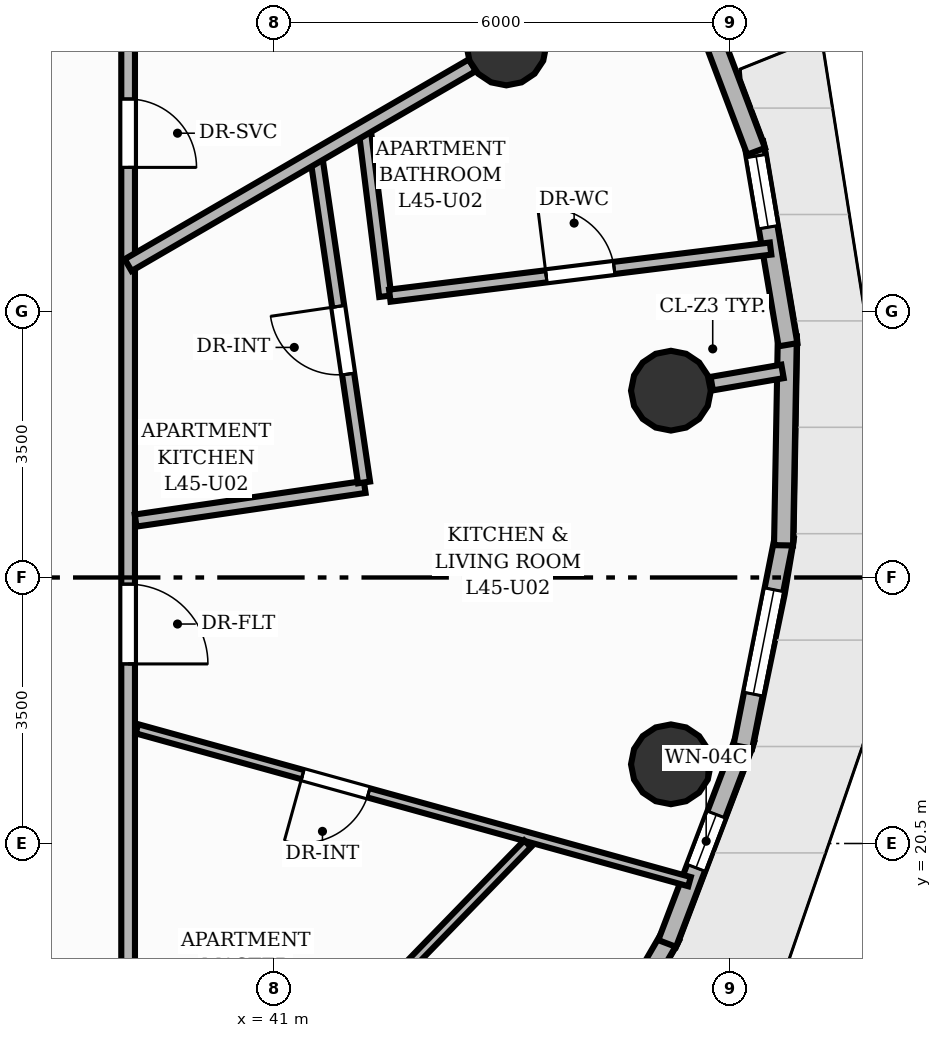
"""IFC4 building model, lengths in metres.
Left out: names, types, materials, properties, quantities, classifications, styles, units other than length and angle.
Written with IfcOpenShell. Run it as: python <this file> out.ifc"""

import sys

from ifc_helpers import new_model, si_unit, direction, frame, frame_2d, origin, origin_2d, place, context, subcontext, project, spatial, rectangle, circle, extrude, element, fill, save


model = new_model("IFC4")
c1 = context("Model", 3, precision=1e-05, world=origin(), true_north=direction((0.0, 1.0)))
c2 = subcontext(c1, "Body", "Model", "MODEL_VIEW")
j1 = project(units=[si_unit("LENGTHUNIT", "METRE"), si_unit("PLANEANGLEUNIT", "RADIAN")], contexts=[c1])
p1 = place(None, origin())
s1 = spatial("IfcSite", under=j1, at=p1, CompositionType="ELEMENT")
p2 = place(p1, origin())
s2 = spatial("IfcBuilding", under=s1, at=p2, CompositionType="ELEMENT")
p3 = place(p2, frame((0.0, 0.0, 152.16)))
s3 = spatial("IfcBuildingStorey", under=s2, at=p3, CompositionType="ELEMENT", Elevation=152.16)
for number, where, z_axis, x_axis in (
    (1, (46.221, 26.458, 0.0), (0.0, 0.0, 1.0), (1.0, 0.0, 0.0)),
    (2, (44.056, 31.0, 0.0), (0.0, 0.0, 1.0), (1.0, 0.0, 0.0)),
    (3, (46.221, 21.542, 0.0), (0.0, 0.0, 1.0), (1.0, 0.0, 0.0)),
):
    element("IfcColumn", number, at=place(p3, frame(where, z_axis=z_axis, x_axis=x_axis)), inside=s3, PredefinedType="COLUMN", context=c2, shape_type="SweptSolid", body=[
        extrude(circle(Radius=0.525, at=origin_2d()), origin(), (0.0, 0.0, 1.0), 3.2),
    ])
p4 = place(p3, frame((46.219, 19.283, 0.0), z_axis=(0.0, 0.0, 1.0), x_axis=(-0.502009170613, -0.864862296912, 0.0)))
e4 = element("IfcWall", 4, at=p4, inside=s3, PredefinedType="SOLIDWALL", context=c2, shape_type="SweptSolid", body=[
    extrude(rectangle(XDim=2.937, YDim=0.25, at=frame_2d((1.469, 0.0))), origin(), (0.0, 0.0, 1.0), 2.96),
])
p5 = place(p4, frame((0.768, 0.0, 0.85)))
e5 = element("IfcOpeningElement", 5, at=p5, cuts=e4, PredefinedType="OPENING", context=c2, shape_type="SweptSolid", body=[
    extrude(rectangle(XDim=1.4, YDim=1.55, at=frame_2d((0.7, 0.775))), frame((0.0, 0.135, 0.0), z_axis=(0.0, -1.0, 0.0), x_axis=(1.0, 0.0, 0.0)), (0.0, 0.0, 1.0), 0.27),
])
p6 = place(p3, frame((47.198, 21.877, 0.0), z_axis=(0.0, 0.0, 1.0), x_axis=(-0.356178525313, -0.934417924756, 0.0)))
e6 = element("IfcWall", 6, at=p6, inside=s3, PredefinedType="SOLIDWALL", context=c2, shape_type="SweptSolid", body=[
    extrude(rectangle(XDim=2.882, YDim=0.25, at=frame_2d((1.441, 0.0))), origin(), (0.0, 0.0, 1.0), 2.96),
])
p7 = place(p6, frame((1.066, 0.0, 0.85)))
e7 = element("IfcOpeningElement", 7, at=p7, cuts=e6, PredefinedType="OPENING", context=c2, shape_type="SweptSolid", body=[
    extrude(rectangle(XDim=0.75, YDim=1.55, at=frame_2d((0.375, 0.775))), frame((0.0, 0.135, 0.0), z_axis=(0.0, -1.0, 0.0), x_axis=(1.0, 0.0, 0.0)), (0.0, 0.0, 1.0), 0.27),
])
p8 = place(p3, frame((47.715, 24.534, 0.0), z_axis=(0.0, 0.0, 1.0), x_axis=(-0.194099406303, -0.980981865517, 0.0)))
e8 = element("IfcWall", 8, at=p8, inside=s3, PredefinedType="SOLIDWALL", context=c2, shape_type="SweptSolid", body=[
    extrude(rectangle(XDim=2.817, YDim=0.25, at=frame_2d((1.409, 0.0))), origin(), (0.0, 0.0, 1.0), 2.96),
])
p9 = place(p8, frame((0.709, 0.0, 0.85)))
e9 = element("IfcOpeningElement", 9, at=p9, cuts=e8, PredefinedType="OPENING", context=c2, shape_type="SweptSolid", body=[
    extrude(rectangle(XDim=1.4, YDim=1.55, at=frame_2d((0.7, 0.775))), frame((0.0, 0.135, 0.0), z_axis=(0.0, -1.0, 0.0), x_axis=(1.0, 0.0, 0.0)), (0.0, 0.0, 1.0), 0.27),
])
p10 = place(p3, frame((47.753, 27.175, 0.0), z_axis=(0.0, 0.0, 1.0), x_axis=(-0.018273942119, -0.999833017578, 0.0)))
e10 = element("IfcWall", 10, at=p10, inside=s3, PredefinedType="SOLIDWALL", context=c2, shape_type="SweptSolid", body=[
    extrude(rectangle(XDim=2.752, YDim=0.25, at=frame_2d((1.376, 0.0))), origin(), (0.0, 0.0, 1.0), 2.96),
])
p11 = place(p3, frame((47.313, 29.718, 0.0), z_axis=(0.0, 0.0, 1.0), x_axis=(0.166721354457, -0.9860040517, 0.0)))
e11 = element("IfcWall", 11, at=p11, inside=s3, PredefinedType="SOLIDWALL", context=c2, shape_type="SweptSolid", body=[
    extrude(rectangle(XDim=2.693, YDim=0.25, at=frame_2d((1.346, 0.0))), origin(), (0.0, 0.0, 1.0), 2.96),
])
p12 = place(p11, frame((0.175, 0.0, 0.85)))
e12 = element("IfcOpeningElement", 12, at=p12, cuts=e11, PredefinedType="OPENING", context=c2, shape_type="SweptSolid", body=[
    extrude(rectangle(XDim=0.95, YDim=1.45, at=frame_2d((0.475, 0.725))), frame((0.0, 0.135, 0.0), z_axis=(0.0, -1.0, 0.0), x_axis=(1.0, 0.0, 0.0)), (0.0, 0.0, 1.0), 0.27),
])
p13 = place(p3, frame((46.408, 32.086, 0.0), z_axis=(0.0, 0.0, 1.0), x_axis=(0.353022229402, -0.93561493444, 0.0)))
e13 = element("IfcWall", 13, at=p13, inside=s3, PredefinedType="SOLIDWALL", context=c2, shape_type="SweptSolid", body=[
    extrude(rectangle(XDim=2.648, YDim=0.25, at=frame_2d((1.324, 0.0))), origin(), (0.0, 0.0, 1.0), 2.96),
])
p14 = place(p3, frame((46.758, 26.551, 0.0), z_axis=(0.0, 0.0, 1.0), x_axis=(0.985363023372, 0.170469094476, 0.0)))
e14 = element("IfcWall", 14, at=p14, inside=s3, PredefinedType="PARTITIONING", context=c2, shape_type="SweptSolid", body=[
    extrude(rectangle(XDim=0.945, YDim=0.18, at=frame_2d((0.473, 0.0))), origin(), (0.0, 0.0, 1.0), 2.336),
])
p15 = place(p3, frame((39.08, 32.58, 0.0), z_axis=(0.0, 0.0, 1.0), x_axis=(0.0, -1.0, 0.0)))
e15 = element("IfcWall", 15, at=p15, inside=s3, PredefinedType="PARTITIONING", context=c2, shape_type="SweptSolid", body=[
    extrude(rectangle(XDim=17.16, YDim=0.18, at=frame_2d((8.58, 0.0))), origin(), (0.0, 0.0, 1.0), 2.955),
])
p16 = place(p15, frame((8.667, 0.0, 0.0)))
e16 = element("IfcOpeningElement", 16, at=p16, cuts=e15, PredefinedType="OPENING", context=c2, shape_type="SweptSolid", body=[
    extrude(rectangle(XDim=1.05, YDim=2.15, at=frame_2d((0.525, 1.075))), frame((0.0, 0.1, 0.0), z_axis=(0.0, -1.0, 0.0), x_axis=(1.0, 0.0, 0.0)), (0.0, 0.0, 1.0), 0.2),
])
p17 = place(p15, frame((2.284, 0.0, 0.0)))
e17 = element("IfcOpeningElement", 17, at=p17, cuts=e15, PredefinedType="OPENING", context=c2, shape_type="SweptSolid", body=[
    extrude(rectangle(XDim=0.9, YDim=2.1, at=frame_2d((0.45, 1.05))), frame((0.0, 0.1, 0.0), z_axis=(0.0, -1.0, 0.0), x_axis=(1.0, 0.0, 0.0)), (0.0, 0.0, 1.0), 0.2),
])
p18 = place(p3, frame((42.189, 29.916, 0.0), z_axis=(0.0, 0.0, 1.0), x_axis=(0.122809822633, -0.99243022297, 0.0)))
e18 = element("IfcWall", 18, at=p18, inside=s3, PredefinedType="PLUMBINGWALL", context=c2, shape_type="SweptSolid", body=[
    extrude(rectangle(XDim=2.232, YDim=0.16, at=frame_2d((1.116, 0.0))), origin(), (0.0, 0.0, 1.0), 2.955),
])
p19 = place(p3, frame((42.523, 27.708, 0.0), z_axis=(0.0, 0.0, 1.0), x_axis=(0.992432598709, 0.122790622685, 0.0)))
e19 = element("IfcWall", 19, at=p19, inside=s3, PredefinedType="PLUMBINGWALL", context=c2, shape_type="SweptSolid", body=[
    extrude(rectangle(XDim=5.048, YDim=0.16, at=frame_2d((2.524, 0.0))), origin(), (0.0, 0.0, 1.0), 2.692),
])
p20 = place(p19, frame((2.074, 0.0, 0.0)))
e20 = element("IfcOpeningElement", 20, at=p20, cuts=e19, PredefinedType="OPENING", context=c2, shape_type="SweptSolid", body=[
    extrude(rectangle(XDim=0.9, YDim=2.1, at=frame_2d((0.45, 1.05))), frame((0.0, 0.09, 0.0), z_axis=(0.0, -1.0, 0.0), x_axis=(1.0, 0.0, 0.0)), (0.0, 0.0, 1.0), 0.18),
])
p21 = place(p3, frame((46.466, 19.998, 0.0), z_axis=(0.0, 0.0, 1.0), x_axis=(-0.963794664313, 0.26664554195, 0.0)))
e21 = element("IfcWall", 21, at=p21, inside=s3, PredefinedType="PARTITIONING", context=c2, shape_type="SweptSolid", body=[
    extrude(rectangle(XDim=7.544, YDim=0.125, at=frame_2d((3.772, 0.0))), origin(), (0.0, 0.0, 1.0), 2.692),
])
p22 = place(p21, frame((4.381, 0.0, 0.0)))
e22 = element("IfcOpeningElement", 22, at=p22, cuts=e21, PredefinedType="OPENING", context=c2, shape_type="SweptSolid", body=[
    extrude(rectangle(XDim=0.9, YDim=2.1, at=frame_2d((0.45, 1.05))), frame((0.0, 0.073, 0.0), z_axis=(0.0, -1.0, 0.0), x_axis=(1.0, 0.0, 0.0)), (0.0, 0.0, 1.0), 0.145),
])
p23 = place(p3, frame((39.179, 24.749, 0.0), z_axis=(0.0, 0.0, 1.0), x_axis=(0.989395416792, 0.145247062726, 0.0)))
e23 = element("IfcWall", 23, at=p23, inside=s3, PredefinedType="PLUMBINGWALL", context=c2, shape_type="SweptSolid", body=[
    extrude(rectangle(XDim=3.046, YDim=0.16, at=frame_2d((1.523, 0.0))), origin(), (0.0, 0.0, 1.0), 2.955),
])
p24 = place(p3, frame((42.184, 25.251, 0.0), z_axis=(0.0, 0.0, 1.0), x_axis=(-0.145293261483, 0.989388633535, 0.0)))
e24 = element("IfcWall", 24, at=p24, inside=s3, PredefinedType="PLUMBINGWALL", context=c2, shape_type="SweptSolid", body=[
    extrude(rectangle(XDim=4.342, YDim=0.16, at=frame_2d((2.171, 0.0))), origin(), (0.0, 0.0, 1.0), 2.955),
])
p25 = place(p24, frame((1.441, 0.0, 0.0)))
e25 = element("IfcOpeningElement", 25, at=p25, cuts=e24, PredefinedType="OPENING", context=c2, shape_type="SweptSolid", body=[
    extrude(rectangle(XDim=0.9, YDim=2.1, at=frame_2d((0.45, 1.05))), frame((0.0, 0.09, 0.0), z_axis=(0.0, -1.0, 0.0), x_axis=(1.0, 0.0, 0.0)), (0.0, 0.0, 1.0), 0.18),
])
p26 = place(p3, frame((39.08, 28.111, 0.0), z_axis=(0.0, 0.0, 1.0), x_axis=(0.864768049288, 0.502171505495, 0.0)))
e26 = element("IfcWall", 26, at=p26, inside=s3, PredefinedType="PARTITIONING", context=c2, shape_type="SweptSolid", body=[
    extrude(rectangle(XDim=5.237, YDim=0.18, at=frame_2d((2.619, 0.0))), origin(), (0.0, 0.0, 1.0), 2.336),
])
p27 = place(p3, frame((44.336, 20.497, 0.0), z_axis=(0.0, 0.0, 1.0), x_axis=(-0.696857448942, -0.717209659621, 0.0)))
e27 = element("IfcWall", 27, at=p27, inside=s3, PredefinedType="PARTITIONING", context=c2, shape_type="SweptSolid", body=[
    extrude(rectangle(XDim=13.052, YDim=0.125, at=frame_2d((6.526, 0.0))), origin(), (0.0, 0.0, 1.0), 2.411),
])
p28 = place(p27, frame((5.516, 0.0, 0.0)))
e28 = element("IfcOpeningElement", 28, at=p28, cuts=e27, PredefinedType="OPENING", context=c2, shape_type="SweptSolid", body=[
    extrude(rectangle(XDim=0.9, YDim=2.1, at=frame_2d((0.45, 1.05))), frame((0.0, 0.073, 0.0), z_axis=(0.0, -1.0, 0.0), x_axis=(1.0, 0.0, 0.0)), (0.0, 0.0, 1.0), 0.145),
])
p29 = place(p7, origin())
e29 = element("IfcWindow", 29, at=p29, inside=s3, PartitioningType="SINGLE_PANEL", PredefinedType="WINDOW", context=c2, shape_type="SweptSolid", body=[
    extrude(rectangle(XDim=0.75, YDim=1.55, at=frame_2d((0.375, 0.775))), frame((0.0, 0.03, 0.0), z_axis=(0.0, -1.0, 0.0), x_axis=(1.0, 0.0, 0.0)), (0.0, 0.0, 1.0), 0.06),
])
fill(e7, e29)
p30 = place(p9, origin())
e30 = element("IfcWindow", 30, at=p30, inside=s3, PartitioningType="SINGLE_PANEL", PredefinedType="WINDOW", context=c2, shape_type="SweptSolid", body=[
    extrude(rectangle(XDim=1.4, YDim=1.55, at=frame_2d((0.7, 0.775))), frame((0.0, 0.03, 0.0), z_axis=(0.0, -1.0, 0.0), x_axis=(1.0, 0.0, 0.0)), (0.0, 0.0, 1.0), 0.06),
])
fill(e9, e30)
p31 = place(p12, origin())
e31 = element("IfcWindow", 31, at=p31, inside=s3, PartitioningType="SINGLE_PANEL", PredefinedType="WINDOW", context=c2, shape_type="SweptSolid", body=[
    extrude(rectangle(XDim=0.95, YDim=1.45, at=frame_2d((0.475, 0.725))), frame((0.0, 0.03, 0.0), z_axis=(0.0, -1.0, 0.0), x_axis=(1.0, 0.0, 0.0)), (0.0, 0.0, 1.0), 0.06),
])
fill(e12, e31)
p32 = place(p16, origin())
e32 = element("IfcDoor", 32, at=p32, inside=s3, OperationType="SINGLE_SWING_RIGHT", PredefinedType="DOOR", context=c2, shape_type="SweptSolid", body=[
    extrude(rectangle(XDim=1.05, YDim=2.15, at=frame_2d((0.525, 1.075))), frame((0.0, 0.025, 0.0), z_axis=(0.0, -1.0, 0.0), x_axis=(1.0, 0.0, 0.0)), (0.0, 0.0, 1.0), 0.05),
])
fill(e16, e32)
p33 = place(p20, origin())
e33 = element("IfcDoor", 33, at=p33, inside=s3, OperationType="SINGLE_SWING_LEFT", PredefinedType="DOOR", context=c2, shape_type="SweptSolid", body=[
    extrude(rectangle(XDim=0.9, YDim=2.1, at=frame_2d((0.45, 1.05))), frame((0.0, 0.025, 0.0), z_axis=(0.0, -1.0, 0.0), x_axis=(1.0, 0.0, 0.0)), (0.0, 0.0, 1.0), 0.05),
])
fill(e20, e33)
p34 = place(p22, origin())
e34 = element("IfcDoor", 34, at=p34, inside=s3, OperationType="SINGLE_SWING_RIGHT", PredefinedType="DOOR", context=c2, shape_type="SweptSolid", body=[
    extrude(rectangle(XDim=0.9, YDim=2.1, at=frame_2d((0.45, 1.05))), frame((0.0, 0.025, 0.0), z_axis=(0.0, -1.0, 0.0), x_axis=(1.0, 0.0, 0.0)), (0.0, 0.0, 1.0), 0.05),
])
fill(e22, e34)
p35 = place(p25, origin())
e35 = element("IfcDoor", 35, at=p35, inside=s3, OperationType="SINGLE_SWING_RIGHT", PredefinedType="DOOR", context=c2, shape_type="SweptSolid", body=[
    extrude(rectangle(XDim=0.9, YDim=2.1, at=frame_2d((0.45, 1.05))), frame((0.0, 0.025, 0.0), z_axis=(0.0, -1.0, 0.0), x_axis=(1.0, 0.0, 0.0)), (0.0, 0.0, 1.0), 0.05),
])
fill(e25, e35)
p36 = place(p17, origin())
e36 = element("IfcDoor", 36, at=p36, inside=s3, OperationType="SINGLE_SWING_RIGHT", PredefinedType="DOOR", context=c2, shape_type="SweptSolid", body=[
    extrude(rectangle(XDim=0.9, YDim=2.1, at=frame_2d((0.45, 1.05))), frame((0.0, 0.025, 0.0), z_axis=(0.0, -1.0, 0.0), x_axis=(1.0, 0.0, 0.0)), (0.0, 0.0, 1.0), 0.05),
])
fill(e17, e36)
save(model, sys.argv[1])
